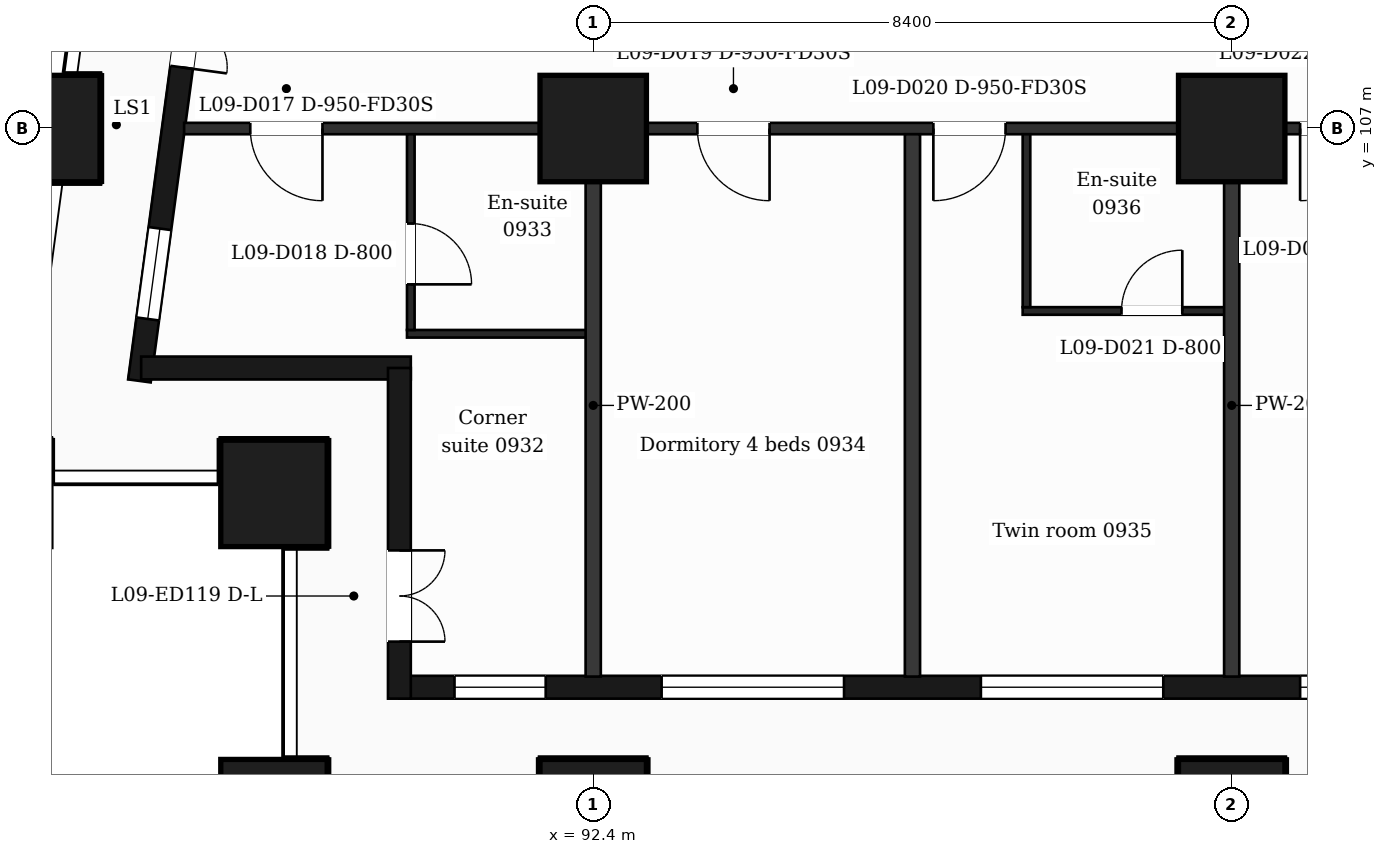
"""IFC4 building model, lengths in metres.
Left out: names, types, materials, properties, quantities, classifications, styles, units other than length and angle.
Written with IfcOpenShell. Run it as: python <this file> out.ifc"""

import sys

from ifc_helpers import new_model, si_unit, direction, frame, frame_2d, origin, origin_2d, place, context, subcontext, project, spatial, rectangle, extrude, element, fill, save


model = new_model("IFC4")
c1 = context("Model", 3, precision=1e-05, world=origin(), true_north=direction((0.0, 1.0)))
c2 = subcontext(c1, "Body", "Model", "MODEL_VIEW")
j1 = project(units=[si_unit("LENGTHUNIT", "METRE"), si_unit("PLANEANGLEUNIT", "RADIAN")], contexts=[c1])
p1 = place(None, origin())
s1 = spatial("IfcSite", under=j1, at=p1, CompositionType="ELEMENT")
p2 = place(p1, origin())
s2 = spatial("IfcBuilding", under=s1, at=p2, CompositionType="ELEMENT")
p3 = place(p2, frame((0.0, 0.0, 49.5)))
s3 = spatial("IfcBuildingStorey", under=s2, at=p3, CompositionType="ELEMENT", Elevation=49.5)
for number, where, z_axis, x_axis in (
    (1, (92.4, 98.0, 0.0), (0.0, 0.0, 1.0), (1.0, 0.0, 0.0)),
    (2, (100.8, 98.0, 0.0), (0.0, 0.0, 1.0), (1.0, 0.0, 0.0)),
    (3, (88.2, 98.0, 0.0), (0.0, 0.0, 1.0), (1.0, 0.0, 0.0)),
    (4, (88.2, 102.2, 0.0), (0.0, 0.0, 1.0), (1.0, 0.0, 0.0)),
    (5, (92.4, 107.0, 0.0), (0.0, 0.0, 1.0), (1.0, 0.0, 0.0)),
    (6, (100.8, 107.0, 0.0), (0.0, 0.0, 1.0), (1.0, 0.0, 0.0)),
    (7, (85.211, 107.0, 0.0), (0.0, 0.0, 1.0), (1.0, 0.0, 0.0)),
):
    element("IfcColumn", number, at=place(p3, frame(where, z_axis=z_axis, x_axis=x_axis)), inside=s3, PredefinedType="COLUMN", context=c2, shape_type="SweptSolid", body=[
        extrude(rectangle(XDim=1.4, YDim=1.4, at=origin_2d()), origin(), (0.0, 0.0, 1.0), 3.5),
    ])
p4 = place(p3, frame((89.85, 99.65, 0.0), z_axis=(0.0, 0.0, 1.0), x_axis=(1.0, 0.0, 0.0)))
e8 = element("IfcWall", 8, at=p4, inside=s3, PredefinedType="SOLIDWALL", context=c2, shape_type="SweptSolid", body=[
    extrude(rectangle(XDim=47.25, YDim=0.3, at=frame_2d((23.625, 0.0))), origin(), (0.0, 0.0, 1.0), 3.18),
])
p5 = place(p4, frame((0.725, 0.0, 0.9)))
e9 = element("IfcOpeningElement", 9, at=p5, cuts=e8, PredefinedType="OPENING", context=c2, shape_type="SweptSolid", body=[
    extrude(rectangle(XDim=1.2, YDim=2.1, at=frame_2d((0.6, 1.05))), frame((0.0, 0.16, 0.0), z_axis=(0.0, -1.0, 0.0), x_axis=(1.0, 0.0, 0.0)), (0.0, 0.0, 1.0), 0.32),
])
p6 = place(p4, frame((3.45, 0.0, 0.9)))
e10 = element("IfcOpeningElement", 10, at=p6, cuts=e8, PredefinedType="OPENING", context=c2, shape_type="SweptSolid", body=[
    extrude(rectangle(XDim=2.4, YDim=2.1, at=frame_2d((1.2, 1.05))), frame((0.0, 0.16, 0.0), z_axis=(0.0, -1.0, 0.0), x_axis=(1.0, 0.0, 0.0)), (0.0, 0.0, 1.0), 0.32),
])
p7 = place(p4, frame((7.65, 0.0, 0.9)))
e11 = element("IfcOpeningElement", 11, at=p7, cuts=e8, PredefinedType="OPENING", context=c2, shape_type="SweptSolid", body=[
    extrude(rectangle(XDim=2.4, YDim=2.1, at=frame_2d((1.2, 1.05))), frame((0.0, 0.16, 0.0), z_axis=(0.0, -1.0, 0.0), x_axis=(1.0, 0.0, 0.0)), (0.0, 0.0, 1.0), 0.32),
])
p8 = place(p4, frame((11.85, 0.0, 0.9)))
e12 = element("IfcOpeningElement", 12, at=p8, cuts=e8, PredefinedType="OPENING", context=c2, shape_type="SweptSolid", body=[
    extrude(rectangle(XDim=2.4, YDim=2.1, at=frame_2d((1.2, 1.05))), frame((0.0, 0.16, 0.0), z_axis=(0.0, -1.0, 0.0), x_axis=(1.0, 0.0, 0.0)), (0.0, 0.0, 1.0), 0.32),
])
p9 = place(p4, frame((16.05, 0.0, 0.9)))
e13 = element("IfcOpeningElement", 13, at=p9, cuts=e8, PredefinedType="OPENING", context=c2, shape_type="SweptSolid", body=[
    extrude(rectangle(XDim=2.4, YDim=2.1, at=frame_2d((1.2, 1.05))), frame((0.0, 0.16, 0.0), z_axis=(0.0, -1.0, 0.0), x_axis=(1.0, 0.0, 0.0)), (0.0, 0.0, 1.0), 0.32),
])
p10 = place(p4, frame((20.25, 0.0, 0.9)))
e14 = element("IfcOpeningElement", 14, at=p10, cuts=e8, PredefinedType="OPENING", context=c2, shape_type="SweptSolid", body=[
    extrude(rectangle(XDim=2.4, YDim=2.1, at=frame_2d((1.2, 1.05))), frame((0.0, 0.16, 0.0), z_axis=(0.0, -1.0, 0.0), x_axis=(1.0, 0.0, 0.0)), (0.0, 0.0, 1.0), 0.32),
])
p11 = place(p4, frame((25.05, 0.0, 0.9)))
e15 = element("IfcOpeningElement", 15, at=p11, cuts=e8, PredefinedType="OPENING", context=c2, shape_type="SweptSolid", body=[
    extrude(rectangle(XDim=1.2, YDim=2.1, at=frame_2d((0.6, 1.05))), frame((0.0, 0.16, 0.0), z_axis=(0.0, -1.0, 0.0), x_axis=(1.0, 0.0, 0.0)), (0.0, 0.0, 1.0), 0.32),
])
p12 = place(p4, frame((29.25, 0.0, 0.9)))
e16 = element("IfcOpeningElement", 16, at=p12, cuts=e8, PredefinedType="OPENING", context=c2, shape_type="SweptSolid", body=[
    extrude(rectangle(XDim=1.2, YDim=2.1, at=frame_2d((0.6, 1.05))), frame((0.0, 0.16, 0.0), z_axis=(0.0, -1.0, 0.0), x_axis=(1.0, 0.0, 0.0)), (0.0, 0.0, 1.0), 0.32),
])
p13 = place(p4, frame((32.55, 0.0, 0.0)))
e17 = element("IfcOpeningElement", 17, at=p13, cuts=e8, PredefinedType="OPENING", context=c2, shape_type="SweptSolid", body=[
    extrude(rectangle(XDim=1.2, YDim=2.4, at=frame_2d((0.6, 1.2))), frame((0.0, 0.16, 0.0), z_axis=(0.0, -1.0, 0.0), x_axis=(1.0, 0.0, 0.0)), (0.0, 0.0, 1.0), 0.32),
])
p14 = place(p4, frame((34.35, 0.0, 0.9)))
e18 = element("IfcOpeningElement", 18, at=p14, cuts=e8, PredefinedType="OPENING", context=c2, shape_type="SweptSolid", body=[
    extrude(rectangle(XDim=1.2, YDim=2.1, at=frame_2d((0.6, 1.05))), frame((0.0, 0.16, 0.0), z_axis=(0.0, -1.0, 0.0), x_axis=(1.0, 0.0, 0.0)), (0.0, 0.0, 1.0), 0.32),
])
p15 = place(p4, frame((37.05, 0.0, 0.9)))
e19 = element("IfcOpeningElement", 19, at=p15, cuts=e8, PredefinedType="OPENING", context=c2, shape_type="SweptSolid", body=[
    extrude(rectangle(XDim=2.4, YDim=2.1, at=frame_2d((1.2, 1.05))), frame((0.0, 0.16, 0.0), z_axis=(0.0, -1.0, 0.0), x_axis=(1.0, 0.0, 0.0)), (0.0, 0.0, 1.0), 0.32),
])
p16 = place(p4, frame((40.95, 0.0, 0.0)))
e20 = element("IfcOpeningElement", 20, at=p16, cuts=e8, PredefinedType="OPENING", context=c2, shape_type="SweptSolid", body=[
    extrude(rectangle(XDim=1.2, YDim=2.4, at=frame_2d((0.6, 1.2))), frame((0.0, 0.16, 0.0), z_axis=(0.0, -1.0, 0.0), x_axis=(1.0, 0.0, 0.0)), (0.0, 0.0, 1.0), 0.32),
])
p17 = place(p4, frame((42.75, 0.0, 0.9)))
e21 = element("IfcOpeningElement", 21, at=p17, cuts=e8, PredefinedType="OPENING", context=c2, shape_type="SweptSolid", body=[
    extrude(rectangle(XDim=1.2, YDim=2.1, at=frame_2d((0.6, 1.05))), frame((0.0, 0.16, 0.0), z_axis=(0.0, -1.0, 0.0), x_axis=(1.0, 0.0, 0.0)), (0.0, 0.0, 1.0), 0.32),
])
p18 = place(p4, frame((45.25, 0.0, 0.9)))
e22 = element("IfcOpeningElement", 22, at=p18, cuts=e8, PredefinedType="OPENING", context=c2, shape_type="SweptSolid", body=[
    extrude(rectangle(XDim=1.2, YDim=2.1, at=frame_2d((0.6, 1.05))), frame((0.0, 0.16, 0.0), z_axis=(0.0, -1.0, 0.0), x_axis=(1.0, 0.0, 0.0)), (0.0, 0.0, 1.0), 0.32),
])
p19 = place(p3, frame((87.334, 110.4, 0.0), z_axis=(0.0, 0.0, 1.0), x_axis=(-0.133437175554, -0.991057273915, 0.0)))
e23 = element("IfcWall", 23, at=p19, inside=s3, PredefinedType="SOLIDWALL", context=c2, shape_type="SweptSolid", body=[
    extrude(rectangle(XDim=6.781, YDim=0.3, at=frame_2d((3.39, 0.0))), origin(), (0.0, 0.0, 1.0), 3.18),
])
p20 = place(p19, frame((1.418, 0.0, 0.0)))
e24 = element("IfcOpeningElement", 24, at=p20, cuts=e23, PredefinedType="OPENING", context=c2, shape_type="SweptSolid", body=[
    extrude(rectangle(XDim=1.2, YDim=2.4, at=frame_2d((0.6, 1.2))), frame((0.0, 0.16, 0.0), z_axis=(0.0, -1.0, 0.0), x_axis=(1.0, 0.0, 0.0)), (0.0, 0.0, 1.0), 0.32),
])
p21 = place(p19, frame((4.758, 0.0, 0.9)))
e25 = element("IfcOpeningElement", 25, at=p21, cuts=e23, PredefinedType="OPENING", context=c2, shape_type="SweptSolid", body=[
    extrude(rectangle(XDim=1.2, YDim=2.1, at=frame_2d((0.6, 1.05))), frame((0.0, 0.16, 0.0), z_axis=(0.0, -1.0, 0.0), x_axis=(1.0, 0.0, 0.0)), (0.0, 0.0, 1.0), 0.32),
])
p22 = place(p3, frame((86.452, 103.85, 0.0), z_axis=(0.0, 0.0, 1.0), x_axis=(1.0, 0.0, 0.0)))
e26 = element("IfcWall", 26, at=p22, inside=s3, PredefinedType="SOLIDWALL", context=c2, shape_type="SweptSolid", body=[
    extrude(rectangle(XDim=3.548, YDim=0.3, at=frame_2d((1.774, 0.0))), origin(), (0.0, 0.0, 1.0), 3.18),
])
p23 = place(p3, frame((89.85, 103.85, 0.0), z_axis=(0.0, 0.0, 1.0), x_axis=(0.0, -1.0, 0.0)))
e27 = element("IfcWall", 27, at=p23, inside=s3, PredefinedType="SOLIDWALL", context=c2, shape_type="SweptSolid", body=[
    extrude(rectangle(XDim=4.35, YDim=0.3, at=frame_2d((2.175, 0.0))), origin(), (0.0, 0.0, 1.0), 3.18),
])
p24 = place(p23, frame((2.4, 0.0, 0.0)))
e28 = element("IfcOpeningElement", 28, at=p24, cuts=e27, PredefinedType="OPENING", context=c2, shape_type="SweptSolid", body=[
    extrude(rectangle(XDim=1.2, YDim=2.4, at=frame_2d((0.6, 1.2))), frame((0.0, 0.16, 0.0), z_axis=(0.0, -1.0, 0.0), x_axis=(1.0, 0.0, 0.0)), (0.0, 0.0, 1.0), 0.32),
])
p25 = place(p3, frame((89.95, 104.3, 0.0), z_axis=(0.0, 0.0, 1.0), x_axis=(1.0, 0.0, 0.0)))
e29 = element("IfcWall", 29, at=p25, inside=s3, PredefinedType="PARTITIONING", context=c2, shape_type="SweptSolid", body=[
    extrude(rectangle(XDim=2.45, YDim=0.1, at=frame_2d((1.225, 0.0))), origin(), (0.0, 0.0, 1.0), 3.18),
])
p26 = place(p3, frame((98.05, 104.6, 0.0), z_axis=(0.0, 0.0, 1.0), x_axis=(1.0, 0.0, 0.0)))
e30 = element("IfcWall", 30, at=p26, inside=s3, PredefinedType="PARTITIONING", context=c2, shape_type="SweptSolid", body=[
    extrude(rectangle(XDim=2.75, YDim=0.1, at=frame_2d((1.375, 0.0))), origin(), (0.0, 0.0, 1.0), 3.18),
])
p27 = place(p26, frame((1.3, 0.0, 0.0)))
e31 = element("IfcOpeningElement", 31, at=p27, cuts=e30, PredefinedType="OPENING", context=c2, shape_type="SweptSolid", body=[
    extrude(rectangle(XDim=0.8, YDim=2.1, at=frame_2d((0.4, 1.05))), frame((0.0, 0.06, 0.0), z_axis=(0.0, -1.0, 0.0), x_axis=(1.0, 0.0, 0.0)), (0.0, 0.0, 1.0), 0.12),
])
p28 = place(p3, frame((87.018, 107.0, 0.0), z_axis=(0.0, 0.0, 1.0), x_axis=(1.0, 0.0, 0.0)))
e32 = element("IfcWall", 32, at=p28, inside=s3, PredefinedType="PARTITIONING", context=c2, shape_type="SweptSolid", body=[
    extrude(rectangle(XDim=52.765, YDim=0.15, at=frame_2d((26.382, 0.0))), origin(), (0.0, 0.0, 1.0), 3.18),
])
p29 = place(p28, frame((0.87, 0.0, 0.0)))
e33 = element("IfcOpeningElement", 33, at=p29, cuts=e32, PredefinedType="OPENING", context=c2, shape_type="SweptSolid", body=[
    extrude(rectangle(XDim=0.95, YDim=2.1, at=frame_2d((0.475, 1.05))), frame((0.0, 0.085, 0.0), z_axis=(0.0, -1.0, 0.0), x_axis=(1.0, 0.0, 0.0)), (0.0, 0.0, 1.0), 0.17),
])
p30 = place(p28, frame((6.752, 0.0, 0.0)))
e34 = element("IfcOpeningElement", 34, at=p30, cuts=e32, PredefinedType="OPENING", context=c2, shape_type="SweptSolid", body=[
    extrude(rectangle(XDim=0.95, YDim=2.1, at=frame_2d((0.475, 1.05))), frame((0.0, 0.085, 0.0), z_axis=(0.0, -1.0, 0.0), x_axis=(1.0, 0.0, 0.0)), (0.0, 0.0, 1.0), 0.17),
])
p31 = place(p28, frame((9.857, 0.0, 0.0)))
e35 = element("IfcOpeningElement", 35, at=p31, cuts=e32, PredefinedType="OPENING", context=c2, shape_type="SweptSolid", body=[
    extrude(rectangle(XDim=0.95, YDim=2.1, at=frame_2d((0.475, 1.05))), frame((0.0, 0.085, 0.0), z_axis=(0.0, -1.0, 0.0), x_axis=(1.0, 0.0, 0.0)), (0.0, 0.0, 1.0), 0.17),
])
p32 = place(p28, frame((14.682, 0.0, 0.0)))
e36 = element("IfcOpeningElement", 36, at=p32, cuts=e32, PredefinedType="OPENING", context=c2, shape_type="SweptSolid", body=[
    extrude(rectangle(XDim=0.95, YDim=2.1, at=frame_2d((0.475, 1.05))), frame((0.0, 0.085, 0.0), z_axis=(0.0, -1.0, 0.0), x_axis=(1.0, 0.0, 0.0)), (0.0, 0.0, 1.0), 0.17),
])
p33 = place(p28, frame((19.862, 0.0, 0.0)))
e37 = element("IfcOpeningElement", 37, at=p33, cuts=e32, PredefinedType="OPENING", context=c2, shape_type="SweptSolid", body=[
    extrude(rectangle(XDim=0.95, YDim=2.1, at=frame_2d((0.475, 1.05))), frame((0.0, 0.085, 0.0), z_axis=(0.0, -1.0, 0.0), x_axis=(1.0, 0.0, 0.0)), (0.0, 0.0, 1.0), 0.17),
])
p34 = place(p28, frame((25.157, 0.0, 0.0)))
e38 = element("IfcOpeningElement", 38, at=p34, cuts=e32, PredefinedType="OPENING", context=c2, shape_type="SweptSolid", body=[
    extrude(rectangle(XDim=0.95, YDim=2.1, at=frame_2d((0.475, 1.05))), frame((0.0, 0.085, 0.0), z_axis=(0.0, -1.0, 0.0), x_axis=(1.0, 0.0, 0.0)), (0.0, 0.0, 1.0), 0.17),
])
p35 = place(p28, frame((28.262, 0.0, 0.0)))
e39 = element("IfcOpeningElement", 39, at=p35, cuts=e32, PredefinedType="OPENING", context=c2, shape_type="SweptSolid", body=[
    extrude(rectangle(XDim=0.95, YDim=2.1, at=frame_2d((0.475, 1.05))), frame((0.0, 0.085, 0.0), z_axis=(0.0, -1.0, 0.0), x_axis=(1.0, 0.0, 0.0)), (0.0, 0.0, 1.0), 0.17),
])
p36 = place(p28, frame((32.207, 0.0, 0.0)))
e40 = element("IfcOpeningElement", 40, at=p36, cuts=e32, PredefinedType="OPENING", context=c2, shape_type="SweptSolid", body=[
    extrude(rectangle(XDim=0.95, YDim=2.1, at=frame_2d((0.475, 1.05))), frame((0.0, 0.085, 0.0), z_axis=(0.0, -1.0, 0.0), x_axis=(1.0, 0.0, 0.0)), (0.0, 0.0, 1.0), 0.17),
])
p37 = place(p28, frame((37.094, 0.0, 0.0)))
e41 = element("IfcOpeningElement", 41, at=p37, cuts=e32, PredefinedType="OPENING", context=c2, shape_type="SweptSolid", body=[
    extrude(rectangle(XDim=0.95, YDim=2.1, at=frame_2d((0.475, 1.05))), frame((0.0, 0.085, 0.0), z_axis=(0.0, -1.0, 0.0), x_axis=(1.0, 0.0, 0.0)), (0.0, 0.0, 1.0), 0.17),
])
p38 = place(p28, frame((43.045, 0.0, 0.0)))
e42 = element("IfcOpeningElement", 42, at=p38, cuts=e32, PredefinedType="OPENING", context=c2, shape_type="SweptSolid", body=[
    extrude(rectangle(XDim=0.95, YDim=2.1, at=frame_2d((0.475, 1.05))), frame((0.0, 0.085, 0.0), z_axis=(0.0, -1.0, 0.0), x_axis=(1.0, 0.0, 0.0)), (0.0, 0.0, 1.0), 0.17),
])
p39 = place(p28, frame((49.285, 0.0, 0.0)))
e43 = element("IfcOpeningElement", 43, at=p39, cuts=e32, PredefinedType="OPENING", context=c2, shape_type="SweptSolid", body=[
    extrude(rectangle(XDim=0.95, YDim=2.1, at=frame_2d((0.475, 1.05))), frame((0.0, 0.085, 0.0), z_axis=(0.0, -1.0, 0.0), x_axis=(1.0, 0.0, 0.0)), (0.0, 0.0, 1.0), 0.17),
])
p40 = place(p3, frame((90.0, 104.35, 0.0), z_axis=(0.0, 0.0, 1.0), x_axis=(0.0, 1.0, 0.0)))
e44 = element("IfcWall", 44, at=p40, inside=s3, PredefinedType="PARTITIONING", context=c2, shape_type="SweptSolid", body=[
    extrude(rectangle(XDim=2.575, YDim=0.1, at=frame_2d((1.288, 0.0))), origin(), (0.0, 0.0, 1.0), 3.18),
])
p41 = place(p40, frame((0.6, 0.0, 0.0)))
e45 = element("IfcOpeningElement", 45, at=p41, cuts=e44, PredefinedType="OPENING", context=c2, shape_type="SweptSolid", body=[
    extrude(rectangle(XDim=0.8, YDim=2.1, at=frame_2d((0.4, 1.05))), frame((0.0, 0.06, 0.0), z_axis=(0.0, -1.0, 0.0), x_axis=(1.0, 0.0, 0.0)), (0.0, 0.0, 1.0), 0.12),
])
for number, where, z_axis, x_axis in (
    (46, (92.4, 99.79, 0.0), (0.0, 0.0, 1.0), (0.0, 1.0, 0.0)),
    (47, (96.6, 99.79, 0.0), (0.0, 0.0, 1.0), (0.0, 1.0, 0.0)),
):
    element("IfcWall", number, at=place(p3, frame(where, z_axis=z_axis, x_axis=x_axis)), inside=s3, PredefinedType="PARTITIONING", context=c2, shape_type="SweptSolid", body=[
        extrude(rectangle(XDim=7.135, YDim=0.2, at=frame_2d((3.567, 0.0))), origin(), (0.0, 0.0, 1.0), 3.18),
    ])
p42 = place(p3, frame((98.1, 104.65, 0.0), z_axis=(0.0, 0.0, 1.0), x_axis=(0.0, 1.0, 0.0)))
e48 = element("IfcWall", 48, at=p42, inside=s3, PredefinedType="PARTITIONING", context=c2, shape_type="SweptSolid", body=[
    extrude(rectangle(XDim=2.275, YDim=0.1, at=frame_2d((1.138, 0.0))), origin(), (0.0, 0.0, 1.0), 3.18),
])
p43 = place(p3, frame((100.8, 99.79, 0.0), z_axis=(0.0, 0.0, 1.0), x_axis=(0.0, 1.0, 0.0)))
e49 = element("IfcWall", 49, at=p43, inside=s3, PredefinedType="PARTITIONING", context=c2, shape_type="SweptSolid", body=[
    extrude(rectangle(XDim=7.135, YDim=0.2, at=frame_2d((3.567, 0.0))), origin(), (0.0, 0.0, 1.0), 3.18),
])
p44 = place(p5, origin())
e50 = element("IfcWindow", 50, at=p44, inside=s3, PartitioningType="SINGLE_PANEL", PredefinedType="WINDOW", context=c2, shape_type="SweptSolid", body=[
    extrude(rectangle(XDim=1.2, YDim=2.1, at=frame_2d((0.6, 1.05))), frame((0.0, 0.03, 0.0), z_axis=(0.0, -1.0, 0.0), x_axis=(1.0, 0.0, 0.0)), (0.0, 0.0, 1.0), 0.06),
])
fill(e9, e50)
p45 = place(p6, origin())
e51 = element("IfcWindow", 51, at=p45, inside=s3, PartitioningType="SINGLE_PANEL", PredefinedType="WINDOW", context=c2, shape_type="SweptSolid", body=[
    extrude(rectangle(XDim=2.4, YDim=2.1, at=frame_2d((1.2, 1.05))), frame((0.0, 0.03, 0.0), z_axis=(0.0, -1.0, 0.0), x_axis=(1.0, 0.0, 0.0)), (0.0, 0.0, 1.0), 0.06),
])
fill(e10, e51)
p46 = place(p7, origin())
e52 = element("IfcWindow", 52, at=p46, inside=s3, PartitioningType="SINGLE_PANEL", PredefinedType="WINDOW", context=c2, shape_type="SweptSolid", body=[
    extrude(rectangle(XDim=2.4, YDim=2.1, at=frame_2d((1.2, 1.05))), frame((0.0, 0.03, 0.0), z_axis=(0.0, -1.0, 0.0), x_axis=(1.0, 0.0, 0.0)), (0.0, 0.0, 1.0), 0.06),
])
fill(e11, e52)
p47 = place(p8, origin())
e53 = element("IfcWindow", 53, at=p47, inside=s3, PartitioningType="SINGLE_PANEL", PredefinedType="WINDOW", context=c2, shape_type="SweptSolid", body=[
    extrude(rectangle(XDim=2.4, YDim=2.1, at=frame_2d((1.2, 1.05))), frame((0.0, 0.03, 0.0), z_axis=(0.0, -1.0, 0.0), x_axis=(1.0, 0.0, 0.0)), (0.0, 0.0, 1.0), 0.06),
])
fill(e12, e53)
p48 = place(p20, origin())
e54 = element("IfcDoor", 54, at=p48, inside=s3, OperationType="DOUBLE_DOOR_SINGLE_SWING", PredefinedType="DOOR", context=c2, shape_type="SweptSolid", body=[
    extrude(rectangle(XDim=1.2, YDim=2.4, at=frame_2d((0.6, 1.2))), frame((0.0, 0.025, 0.0), z_axis=(0.0, -1.0, 0.0), x_axis=(1.0, 0.0, 0.0)), (0.0, 0.0, 1.0), 0.05),
])
fill(e24, e54)
p49 = place(p21, origin())
e55 = element("IfcWindow", 55, at=p49, inside=s3, PartitioningType="SINGLE_PANEL", PredefinedType="WINDOW", context=c2, shape_type="SweptSolid", body=[
    extrude(rectangle(XDim=1.2, YDim=2.1, at=frame_2d((0.6, 1.05))), frame((0.0, 0.03, 0.0), z_axis=(0.0, -1.0, 0.0), x_axis=(1.0, 0.0, 0.0)), (0.0, 0.0, 1.0), 0.06),
])
fill(e25, e55)
p50 = place(p24, origin())
e56 = element("IfcDoor", 56, at=p50, inside=s3, OperationType="DOUBLE_DOOR_SINGLE_SWING", PredefinedType="DOOR", context=c2, shape_type="SweptSolid", body=[
    extrude(rectangle(XDim=1.2, YDim=2.4, at=frame_2d((0.6, 1.2))), frame((0.0, 0.025, 0.0), z_axis=(0.0, -1.0, 0.0), x_axis=(1.0, 0.0, 0.0)), (0.0, 0.0, 1.0), 0.05),
])
fill(e28, e56)
p51 = place(p29, origin())
e57 = element("IfcDoor", 57, at=p51, inside=s3, OperationType="SINGLE_SWING_RIGHT", PredefinedType="DOOR", context=c2, shape_type="SweptSolid", body=[
    extrude(rectangle(XDim=0.95, YDim=2.1, at=frame_2d((0.475, 1.05))), frame((0.0, 0.025, 0.0), z_axis=(0.0, -1.0, 0.0), x_axis=(1.0, 0.0, 0.0)), (0.0, 0.0, 1.0), 0.05),
])
fill(e33, e57)
p52 = place(p41, origin())
e58 = element("IfcDoor", 58, at=p52, inside=s3, OperationType="SINGLE_SWING_LEFT", PredefinedType="DOOR", context=c2, shape_type="SweptSolid", body=[
    extrude(rectangle(XDim=0.8, YDim=2.1, at=frame_2d((0.4, 1.05))), frame((0.0, 0.025, 0.0), z_axis=(0.0, -1.0, 0.0), x_axis=(1.0, 0.0, 0.0)), (0.0, 0.0, 1.0), 0.05),
])
fill(e45, e58)
p53 = place(p30, origin())
e59 = element("IfcDoor", 59, at=p53, inside=s3, OperationType="SINGLE_SWING_RIGHT", PredefinedType="DOOR", context=c2, shape_type="SweptSolid", body=[
    extrude(rectangle(XDim=0.95, YDim=2.1, at=frame_2d((0.475, 1.05))), frame((0.0, 0.025, 0.0), z_axis=(0.0, -1.0, 0.0), x_axis=(1.0, 0.0, 0.0)), (0.0, 0.0, 1.0), 0.05),
])
fill(e34, e59)
p54 = place(p31, origin())
e60 = element("IfcDoor", 60, at=p54, inside=s3, OperationType="SINGLE_SWING_LEFT", PredefinedType="DOOR", context=c2, shape_type="SweptSolid", body=[
    extrude(rectangle(XDim=0.95, YDim=2.1, at=frame_2d((0.475, 1.05))), frame((0.0, 0.025, 0.0), z_axis=(0.0, -1.0, 0.0), x_axis=(1.0, 0.0, 0.0)), (0.0, 0.0, 1.0), 0.05),
])
fill(e35, e60)
p55 = place(p27, origin())
e61 = element("IfcDoor", 61, at=p55, inside=s3, OperationType="SINGLE_SWING_RIGHT", PredefinedType="DOOR", context=c2, shape_type="SweptSolid", body=[
    extrude(rectangle(XDim=0.8, YDim=2.1, at=frame_2d((0.4, 1.05))), frame((0.0, 0.025, 0.0), z_axis=(0.0, -1.0, 0.0), x_axis=(1.0, 0.0, 0.0)), (0.0, 0.0, 1.0), 0.05),
])
fill(e31, e61)
p56 = place(p32, origin())
e62 = element("IfcDoor", 62, at=p56, inside=s3, OperationType="SINGLE_SWING_LEFT", PredefinedType="DOOR", context=c2, shape_type="SweptSolid", body=[
    extrude(rectangle(XDim=0.95, YDim=2.1, at=frame_2d((0.475, 1.05))), frame((0.0, 0.025, 0.0), z_axis=(0.0, -1.0, 0.0), x_axis=(1.0, 0.0, 0.0)), (0.0, 0.0, 1.0), 0.05),
])
fill(e36, e62)
save(model, sys.argv[1])
